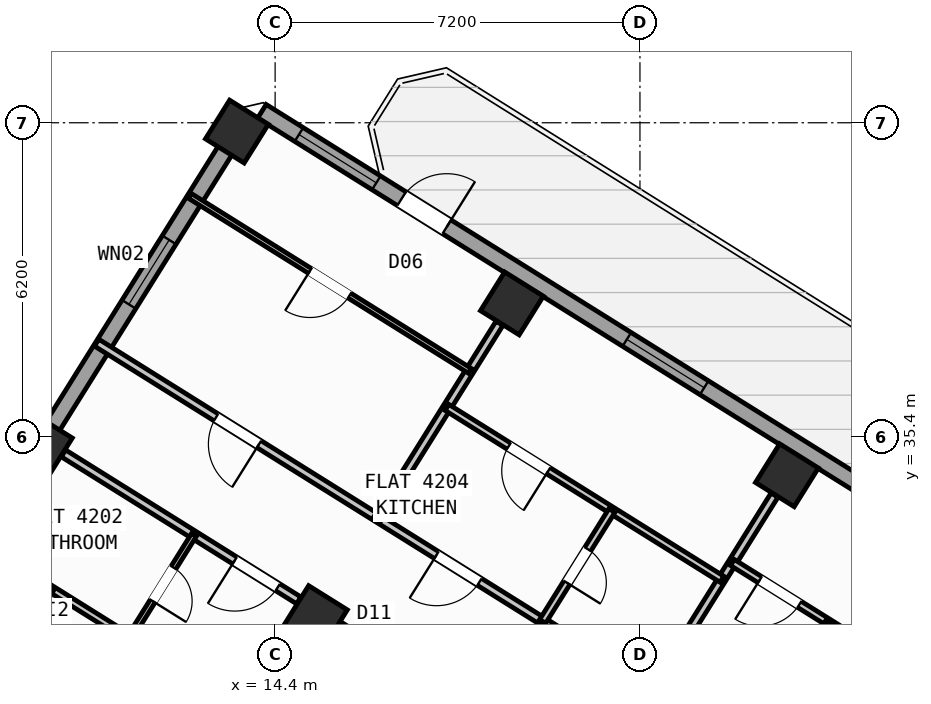
"""IFC4 building model, lengths in metres.
Left out: names, types, materials, properties, quantities, classifications, styles, units other than length and angle.
Written with IfcOpenShell. Run it as: python <this file> out.ifc"""

import sys

from ifc_helpers import new_model, si_unit, direction, frame, frame_2d, origin, origin_2d, place, context, subcontext, project, spatial, rectangle, hollow_rectangle, extrude, source, transform, mapped, element, fill, save


model = new_model("IFC4")
c1 = context("Model", 3, precision=1e-05, world=origin(), true_north=direction((0.0, 1.0)))
c2 = subcontext(c1, "Body", "Model", "MODEL_VIEW")
j1 = project(units=[si_unit("LENGTHUNIT", "METRE"), si_unit("PLANEANGLEUNIT", "RADIAN")], contexts=[c1])
p1 = place(None, origin())
s1 = spatial("IfcSite", under=j1, at=p1, CompositionType="ELEMENT")
p2 = place(p1, origin())
s2 = spatial("IfcBuilding", under=s1, at=p2, CompositionType="ELEMENT")
p3 = place(p2, frame((0.0, 0.0, 165.9)))
s3 = spatial("IfcBuildingStorey", under=s2, at=p3, CompositionType="ELEMENT", Elevation=165.9)
m1 = source(origin(), c2, "Body", "SweptSolid", [
    extrude(hollow_rectangle(XDim=0.9, YDim=0.9, WallThickness=0.036, at=origin_2d()), origin(), (0.0, 0.0, 1.0), 3.6),
])
for number, where, z_axis, x_axis in (
    (1, (24.5, 34.643, 0.0), (0.0, 0.0, 1.0), (-0.848, 0.53, 0.0)),
    (2, (19.073, 38.034, 0.0), (0.0, 0.0, 1.0), (-0.848, 0.53, 0.0)),
    (3, (15.205, 31.844, 0.0), (0.0, 0.0, 1.0), (-0.848, 0.53, 0.0)),
    (4, (13.646, 41.426, 0.0), (0.0, 0.0, 1.0), (-0.848, 0.53, 0.0)),
    (5, (9.777, 35.235, 0.0), (0.0, 0.0, 1.0), (-0.848, 0.53, 0.0)),
):
    element("IfcColumn", number, at=place(p3, frame(where, z_axis=z_axis, x_axis=x_axis)), inside=s3, PredefinedType="COLUMN", context=c2, shape_type="MappedRepresentation", body=[
        mapped(m1, transform((0.0, 0.0, 0.0), scale=1.0)),
    ])
p4 = place(p3, frame((2.415, 23.452, 0.0), z_axis=(0.0, 0.0, 1.0), x_axis=(0.52991049553, 0.848053575387, 0.0)))
e6 = element("IfcWall", 6, at=p4, inside=s3, PredefinedType="STANDARD", context=c2, shape_type="SweptSolid", body=[
    extrude(rectangle(XDim=21.587, YDim=0.32, at=frame_2d((10.794, 0.0))), origin(), (0.0, 0.0, 1.0), 2.795),
])
p5 = place(p4, frame((1.673, 0.0, 0.8)))
e7 = element("IfcOpeningElement", 7, at=p5, cuts=e6, PredefinedType="OPENING", context=c2, shape_type="SweptSolid", body=[
    extrude(rectangle(XDim=2.1, YDim=1.55, at=frame_2d((1.05, 0.775))), frame((0.0, 0.17, 0.0), z_axis=(0.0, -1.0, 0.0), x_axis=(1.0, 0.0, 0.0)), (0.0, 0.0, 1.0), 0.34),
])
p6 = place(p4, frame((8.334, 0.0, 0.85)))
e8 = element("IfcOpeningElement", 8, at=p6, cuts=e6, PredefinedType="OPENING", context=c2, shape_type="SweptSolid", body=[
    extrude(rectangle(XDim=1.8, YDim=1.5, at=frame_2d((0.9, 0.75))), frame((0.0, 0.17, 0.0), z_axis=(0.0, -1.0, 0.0), x_axis=(1.0, 0.0, 0.0)), (0.0, 0.0, 1.0), 0.34),
])
p7 = place(p4, frame((17.172, 0.0, 0.85)))
e9 = element("IfcOpeningElement", 9, at=p7, cuts=e6, PredefinedType="OPENING", context=c2, shape_type="SweptSolid", body=[
    extrude(rectangle(XDim=1.5, YDim=1.5, at=frame_2d((0.75, 0.75))), frame((0.0, 0.17, 0.0), z_axis=(0.0, -1.0, 0.0), x_axis=(1.0, 0.0, 0.0)), (0.0, 0.0, 1.0), 0.34),
])
p8 = place(p3, frame((14.138, 41.825, 0.0), z_axis=(0.0, 0.0, 1.0), x_axis=(0.848046498049, -0.529921821731, 0.0)))
e10 = element("IfcWall", 10, at=p8, inside=s3, PredefinedType="STANDARD", context=c2, shape_type="SweptSolid", body=[
    extrude(rectangle(XDim=31.588, YDim=0.32, at=frame_2d((15.794, 0.0))), origin(), (0.0, 0.0, 1.0), 3.32),
])
p9 = place(p8, frame((3.253, 0.0, 0.0)))
e11 = element("IfcOpeningElement", 11, at=p9, cuts=e10, PredefinedType="OPENING", context=c2, shape_type="SweptSolid", body=[
    extrude(rectangle(XDim=1.05, YDim=2.15, at=frame_2d((0.525, 1.075))), frame((0.0, 0.17, 0.0), z_axis=(0.0, -1.0, 0.0), x_axis=(1.0, 0.0, 0.0)), (0.0, 0.0, 1.0), 0.34),
])
p10 = place(p8, frame((0.863, 0.0, 0.85)))
e12 = element("IfcOpeningElement", 12, at=p10, cuts=e10, PredefinedType="OPENING", context=c2, shape_type="SweptSolid", body=[
    extrude(rectangle(XDim=1.8, YDim=1.5, at=frame_2d((0.9, 0.75))), frame((0.0, 0.17, 0.0), z_axis=(0.0, -1.0, 0.0), x_axis=(1.0, 0.0, 0.0)), (0.0, 0.0, 1.0), 0.34),
])
p11 = place(p8, frame((8.494, 0.0, 0.85)))
e13 = element("IfcOpeningElement", 13, at=p11, cuts=e10, PredefinedType="OPENING", context=c2, shape_type="SweptSolid", body=[
    extrude(rectangle(XDim=1.8, YDim=1.5, at=frame_2d((0.9, 0.75))), frame((0.0, 0.17, 0.0), z_axis=(0.0, -1.0, 0.0), x_axis=(1.0, 0.0, 0.0)), (0.0, 0.0, 1.0), 0.34),
])
p12 = place(p8, frame((13.874, 0.0, 0.85)))
e14 = element("IfcOpeningElement", 14, at=p12, cuts=e10, PredefinedType="OPENING", context=c2, shape_type="SweptSolid", body=[
    extrude(rectangle(XDim=1.5, YDim=1.5, at=frame_2d((0.75, 0.75))), frame((0.0, 0.17, 0.0), z_axis=(0.0, -1.0, 0.0), x_axis=(1.0, 0.0, 0.0)), (0.0, 0.0, 1.0), 0.34),
])
p13 = place(p8, frame((17.104, 0.0, 1.0)))
e15 = element("IfcOpeningElement", 15, at=p13, cuts=e10, PredefinedType="OPENING", context=c2, shape_type="SweptSolid", body=[
    extrude(rectangle(XDim=0.9, YDim=1.25, at=frame_2d((0.45, 0.625))), frame((0.0, 0.17, 0.0), z_axis=(0.0, -1.0, 0.0), x_axis=(1.0, 0.0, 0.0)), (0.0, 0.0, 1.0), 0.34),
])
p14 = place(p8, frame((22.144, 0.0, 1.0)))
e16 = element("IfcOpeningElement", 16, at=p14, cuts=e10, PredefinedType="OPENING", context=c2, shape_type="SweptSolid", body=[
    extrude(rectangle(XDim=0.9, YDim=1.25, at=frame_2d((0.45, 0.625))), frame((0.0, 0.17, 0.0), z_axis=(0.0, -1.0, 0.0), x_axis=(1.0, 0.0, 0.0)), (0.0, 0.0, 1.0), 0.34),
])
p15 = place(p8, frame((27.744, 0.0, 1.0)))
e17 = element("IfcOpeningElement", 17, at=p15, cuts=e10, PredefinedType="OPENING", context=c2, shape_type="SweptSolid", body=[
    extrude(rectangle(XDim=0.9, YDim=1.25, at=frame_2d((0.45, 0.625))), frame((0.0, 0.17, 0.0), z_axis=(0.0, -1.0, 0.0), x_axis=(1.0, 0.0, 0.0)), (0.0, 0.0, 1.0), 0.34),
])
p16 = place(p3, frame((27.953, 33.016, 0.0), z_axis=(0.0, 0.0, 1.0), x_axis=(-0.529906322364, -0.848056182997, 0.0)))
e18 = element("IfcWall", 18, at=p16, inside=s3, PredefinedType="PARTITIONING", context=c2, shape_type="SweptSolid", body=[
    extrude(rectangle(XDim=5.45, YDim=0.16, at=frame_2d((2.725, 0.0))), origin(), (0.0, 0.0, 1.0), 3.31),
])
p17 = place(p3, frame((25.065, 28.394, 0.0), z_axis=(0.0, 0.0, 1.0), x_axis=(-0.848048310262, 0.529918921593, 0.0)))
e19 = element("IfcWall", 19, at=p17, inside=s3, PredefinedType="PARTITIONING", context=c2, shape_type="SweptSolid", body=[
    extrude(rectangle(XDim=16.73, YDim=0.16, at=frame_2d((8.365, 0.0))), origin(), (0.0, 0.0, 1.0), 3.31),
])
p18 = place(p17, frame((2.22, 0.0, 0.0)))
e20 = element("IfcOpeningElement", 20, at=p18, cuts=e19, PredefinedType="OPENING", context=c2, shape_type="SweptSolid", body=[
    extrude(rectangle(XDim=0.86, YDim=2.05, at=frame_2d((0.43, 1.025))), frame((0.0, 0.09, 0.0), z_axis=(0.0, -1.0, 0.0), x_axis=(1.0, 0.0, 0.0)), (0.0, 0.0, 1.0), 0.18),
])
p19 = place(p17, frame((7.82, 0.0, 0.0)))
e21 = element("IfcOpeningElement", 21, at=p19, cuts=e19, PredefinedType="OPENING", context=c2, shape_type="SweptSolid", body=[
    extrude(rectangle(XDim=1.0, YDim=2.1, at=frame_2d((0.5, 1.05))), frame((0.0, 0.09, 0.0), z_axis=(0.0, -1.0, 0.0), x_axis=(1.0, 0.0, 0.0)), (0.0, 0.0, 1.0), 0.18),
])
p20 = place(p17, frame((12.95, 0.0, 0.0)))
e22 = element("IfcOpeningElement", 22, at=p20, cuts=e19, PredefinedType="OPENING", context=c2, shape_type="SweptSolid", body=[
    extrude(rectangle(XDim=1.0, YDim=2.1, at=frame_2d((0.5, 1.05))), frame((0.0, 0.09, 0.0), z_axis=(0.0, -1.0, 0.0), x_axis=(1.0, 0.0, 0.0)), (0.0, 0.0, 1.0), 0.18),
])
p21 = place(p3, frame((20.293, 28.782, 0.0), z_axis=(0.0, 0.0, 1.0), x_axis=(-0.848040881926, 0.529930809241, 0.0)))
e23 = element("IfcWall", 23, at=p21, inside=s3, PredefinedType="PARTITIONING", context=c2, shape_type="SweptSolid", body=[
    extrude(rectangle(XDim=5.476, YDim=0.16, at=frame_2d((2.738, 0.0))), origin(), (0.0, 0.0, 1.0), 2.795),
])
p22 = place(p21, frame((3.568, 0.0, 0.0)))
e24 = element("IfcOpeningElement", 24, at=p22, cuts=e23, PredefinedType="OPENING", context=c2, shape_type="SweptSolid", body=[
    extrude(rectangle(XDim=1.0, YDim=2.1, at=frame_2d((0.5, 1.05))), frame((0.0, 0.09, 0.0), z_axis=(0.0, -1.0, 0.0), x_axis=(1.0, 0.0, 0.0)), (0.0, 0.0, 1.0), 0.18),
])
p23 = place(p3, frame((14.866, 32.173, 0.0), z_axis=(0.0, 0.0, 1.0), x_axis=(-0.848053401719, 0.529910773464, 0.0)))
e25 = element("IfcWall", 25, at=p23, inside=s3, PredefinedType="PARTITIONING", context=c2, shape_type="SweptSolid", body=[
    extrude(rectangle(XDim=5.476, YDim=0.16, at=frame_2d((2.738, 0.0))), origin(), (0.0, 0.0, 1.0), 2.795),
])
p24 = place(p23, frame((0.488, 0.0, 0.0)))
e26 = element("IfcOpeningElement", 26, at=p24, cuts=e25, PredefinedType="OPENING", context=c2, shape_type="SweptSolid", body=[
    extrude(rectangle(XDim=1.0, YDim=2.1, at=frame_2d((0.5, 1.05))), frame((0.0, 0.09, 0.0), z_axis=(0.0, -1.0, 0.0), x_axis=(1.0, 0.0, 0.0)), (0.0, 0.0, 1.0), 0.18),
])
p25 = place(p3, frame((12.798, 33.465, 0.0), z_axis=(0.0, 0.0, 1.0), x_axis=(-0.529916182913, -0.848050021571, 0.0)))
e27 = element("IfcWall", 27, at=p25, inside=s3, PredefinedType="PARTITIONING", context=c2, shape_type="SweptSolid", body=[
    extrude(rectangle(XDim=14.32, YDim=0.11, at=frame_2d((7.16, 0.0))), origin(), (0.0, 0.0, 1.0), 3.31),
])
p26 = place(p25, frame((0.76, 0.0, 0.0)))
e28 = element("IfcOpeningElement", 28, at=p26, cuts=e27, PredefinedType="OPENING", context=c2, shape_type="SweptSolid", body=[
    extrude(rectangle(XDim=0.78, YDim=2.05, at=frame_2d((0.39, 1.025))), frame((0.0, 0.065, 0.0), z_axis=(0.0, -1.0, 0.0), x_axis=(1.0, 0.0, 0.0)), (0.0, 0.0, 1.0), 0.13),
])
p27 = place(p25, frame((5.281, 0.0, 0.0)))
e29 = element("IfcOpeningElement", 29, at=p27, cuts=e27, PredefinedType="OPENING", context=c2, shape_type="SweptSolid", body=[
    extrude(rectangle(XDim=0.92, YDim=2.08, at=frame_2d((0.46, 1.04))), frame((0.0, 0.065, 0.0), z_axis=(0.0, -1.0, 0.0), x_axis=(1.0, 0.0, 0.0)), (0.0, 0.0, 1.0), 0.13),
])
p28 = place(p3, frame((11.526, 31.43, 0.0), z_axis=(0.0, 0.0, 1.0), x_axis=(-0.848051346257, 0.52991406295, 0.0)))
e30 = element("IfcWall", 30, at=p28, inside=s3, PredefinedType="PLUMBINGWALL", context=c2, shape_type="SweptSolid", body=[
    extrude(rectangle(XDim=3.62, YDim=0.14, at=frame_2d((1.81, 0.0))), origin(), (0.0, 0.0, 1.0), 3.31),
])
p29 = place(p3, frame((24.256, 34.251, 0.0), z_axis=(0.0, 0.0, 1.0), x_axis=(-0.529926399231, -0.848043637673, 0.0)))
e31 = element("IfcWall", 31, at=p29, inside=s3, PredefinedType="PARTITIONING", context=c2, shape_type="SweptSolid", body=[
    extrude(rectangle(XDim=4.538, YDim=0.16, at=frame_2d((2.269, 0.0))), origin(), (0.0, 0.0, 1.0), 2.795),
])
p30 = place(p3, frame((26.639, 30.913, 0.0), z_axis=(0.0, 0.0, 1.0), x_axis=(-0.84803087207, 0.529946827537, 0.0)))
e32 = element("IfcWall", 32, at=p30, inside=s3, PredefinedType="PLUMBINGWALL", context=c2, shape_type="SweptSolid", body=[
    extrude(rectangle(XDim=3.79, YDim=0.14, at=frame_2d((1.895, 0.0))), origin(), (0.0, 0.0, 1.0), 3.31),
])
p31 = place(p30, frame((2.23, 0.0, 0.0)))
e33 = element("IfcOpeningElement", 33, at=p31, cuts=e32, PredefinedType="OPENING", context=c2, shape_type="SweptSolid", body=[
    extrude(rectangle(XDim=0.92, YDim=2.08, at=frame_2d((0.46, 1.04))), frame((0.0, 0.08, 0.0), z_axis=(0.0, -1.0, 0.0), x_axis=(1.0, 0.0, 0.0)), (0.0, 0.0, 1.0), 0.16),
])
p32 = place(p3, frame((25.324, 31.734, 0.0), z_axis=(0.0, 0.0, 1.0), x_axis=(-0.529873322326, -0.848076802116, 0.0)))
e34 = element("IfcWall", 34, at=p32, inside=s3, PredefinedType="PLUMBINGWALL", context=c2, shape_type="SweptSolid", body=[
    extrude(rectangle(XDim=2.97, YDim=0.14, at=frame_2d((1.485, 0.0))), origin(), (0.0, 0.0, 1.0), 2.935),
])
p33 = place(p32, frame((1.095, 0.0, 0.0)))
e35 = element("IfcOpeningElement", 35, at=p33, cuts=e34, PredefinedType="OPENING", context=c2, shape_type="SweptSolid", body=[
    extrude(rectangle(XDim=0.78, YDim=2.05, at=frame_2d((0.39, 1.025))), frame((0.0, 0.08, 0.0), z_axis=(0.0, -1.0, 0.0), x_axis=(1.0, 0.0, 0.0)), (0.0, 0.0, 1.0), 0.16),
])
p34 = place(p3, frame((18.828, 37.643, 0.0), z_axis=(0.0, 0.0, 1.0), x_axis=(-0.529926399231, -0.848043637673, 0.0)))
e36 = element("IfcWall", 36, at=p34, inside=s3, PredefinedType="PARTITIONING", context=c2, shape_type="SweptSolid", body=[
    extrude(rectangle(XDim=4.538, YDim=0.16, at=frame_2d((2.269, 0.0))), origin(), (0.0, 0.0, 1.0), 2.795),
])
p35 = place(p3, frame((23.218, 32.591, 0.0), z_axis=(0.0, 0.0, 1.0), x_axis=(-0.848056163074, 0.529906354247, 0.0)))
e37 = element("IfcWall", 37, at=p35, inside=s3, PredefinedType="PLUMBINGWALL", context=c2, shape_type="SweptSolid", body=[
    extrude(rectangle(XDim=6.4, YDim=0.14, at=frame_2d((3.2, 0.0))), origin(), (0.0, 0.0, 1.0), 3.31),
])
p36 = place(p35, frame((4.04, 0.0, 0.0)))
e38 = element("IfcOpeningElement", 38, at=p36, cuts=e37, PredefinedType="OPENING", context=c2, shape_type="SweptSolid", body=[
    extrude(rectangle(XDim=0.92, YDim=2.08, at=frame_2d((0.46, 1.04))), frame((0.0, 0.08, 0.0), z_axis=(0.0, -1.0, 0.0), x_axis=(1.0, 0.0, 0.0)), (0.0, 0.0, 1.0), 0.16),
])
p37 = place(p3, frame((21.047, 33.947, 0.0), z_axis=(0.0, 0.0, 1.0), x_axis=(-0.529913878929, -0.848051461244, 0.0)))
e39 = element("IfcWall", 39, at=p37, inside=s3, PredefinedType="PLUMBINGWALL", context=c2, shape_type="SweptSolid", body=[
    extrude(rectangle(XDim=2.58, YDim=0.14, at=frame_2d((1.29, 0.0))), origin(), (0.0, 0.0, 1.0), 3.31),
])
p38 = place(p37, frame((0.9, 0.0, 0.0)))
e40 = element("IfcOpeningElement", 40, at=p38, cuts=e39, PredefinedType="OPENING", context=c2, shape_type="SweptSolid", body=[
    extrude(rectangle(XDim=0.78, YDim=2.05, at=frame_2d((0.39, 1.025))), frame((0.0, 0.08, 0.0), z_axis=(0.0, -1.0, 0.0), x_axis=(1.0, 0.0, 0.0)), (0.0, 0.0, 1.0), 0.16),
])
p39 = place(p3, frame((18.242, 36.705, 0.0), z_axis=(0.0, 0.0, 1.0), x_axis=(-0.848048787466, 0.529918157905, 0.0)))
e41 = element("IfcWall", 41, at=p39, inside=s3, PredefinedType="PARTITIONING", context=c2, shape_type="SweptSolid", body=[
    extrude(rectangle(XDim=6.52, YDim=0.11, at=frame_2d((3.26, 0.0))), origin(), (0.0, 0.0, 1.0), 3.31),
])
p40 = place(p39, frame((2.8, 0.0, 0.0)))
e42 = element("IfcOpeningElement", 42, at=p40, cuts=e41, PredefinedType="OPENING", context=c2, shape_type="SweptSolid", body=[
    extrude(rectangle(XDim=0.92, YDim=2.08, at=frame_2d((0.46, 1.04))), frame((0.0, 0.065, 0.0), z_axis=(0.0, -1.0, 0.0), x_axis=(1.0, 0.0, 0.0)), (0.0, 0.0, 1.0), 0.13),
])
m2 = source(origin(), c2, "Body", "SweptSolid", [
    extrude(rectangle(XDim=1.05, YDim=2.15, at=frame_2d((0.525, 1.075))), frame((0.0, 0.025, 0.0), z_axis=(0.0, -1.0, 0.0), x_axis=(1.0, 0.0, 0.0)), (0.0, 0.0, 1.0), 0.05),
])
p41 = place(p9, origin())
e43 = element("IfcDoor", 43, at=p41, inside=s3, OperationType="SINGLE_SWING_RIGHT", PredefinedType="DOOR", context=c2, shape_type="MappedRepresentation", body=[
    mapped(m2, transform((0.0, 0.0, 0.0), scale=1.0)),
])
fill(e11, e43)
m3 = source(origin(), c2, "Body", "SweptSolid", [
    extrude(rectangle(XDim=1.5, YDim=1.5, at=frame_2d((0.75, 0.75))), frame((0.0, 0.03, 0.0), z_axis=(0.0, -1.0, 0.0), x_axis=(1.0, 0.0, 0.0)), (0.0, 0.0, 1.0), 0.06),
])
p42 = place(p7, origin())
e44 = element("IfcWindow", 44, at=p42, inside=s3, PartitioningType="SINGLE_PANEL", PredefinedType="WINDOW", context=c2, shape_type="MappedRepresentation", body=[
    mapped(m3, transform((0.0, 0.0, 0.0), scale=1.0)),
])
fill(e9, e44)
m4 = source(origin(), c2, "Body", "SweptSolid", [
    extrude(rectangle(XDim=1.8, YDim=1.5, at=frame_2d((0.9, 0.75))), frame((0.0, 0.03, 0.0), z_axis=(0.0, -1.0, 0.0), x_axis=(1.0, 0.0, 0.0)), (0.0, 0.0, 1.0), 0.06),
])
p43 = place(p10, origin())
e45 = element("IfcWindow", 45, at=p43, inside=s3, PartitioningType="SINGLE_PANEL", PredefinedType="WINDOW", context=c2, shape_type="MappedRepresentation", body=[
    mapped(m4, transform((0.0, 0.0, 0.0), scale=1.0)),
])
fill(e12, e45)
p44 = place(p11, origin())
e46 = element("IfcWindow", 46, at=p44, inside=s3, PartitioningType="SINGLE_PANEL", PredefinedType="WINDOW", context=c2, shape_type="MappedRepresentation", body=[
    mapped(m4, transform((0.0, 0.0, 0.0), scale=1.0)),
])
fill(e13, e46)
m5 = source(origin(), c2, "Body", "SweptSolid", [
    extrude(rectangle(XDim=1.0, YDim=2.1, at=frame_2d((0.5, 1.05))), frame((0.0, 0.025, 0.0), z_axis=(0.0, -1.0, 0.0), x_axis=(1.0, 0.0, 0.0)), (0.0, 0.0, 1.0), 0.05),
])
p45 = place(p24, origin())
e47 = element("IfcDoor", 47, at=p45, inside=s3, OperationType="SINGLE_SWING_RIGHT", PredefinedType="DOOR", context=c2, shape_type="MappedRepresentation", body=[
    mapped(m5, transform((0.0, 0.0, 0.0), scale=1.0)),
])
fill(e26, e47)
m6 = source(origin(), c2, "Body", "SweptSolid", [
    extrude(rectangle(XDim=0.78, YDim=2.05, at=frame_2d((0.39, 1.025))), frame((0.0, 0.025, 0.0), z_axis=(0.0, -1.0, 0.0), x_axis=(1.0, 0.0, 0.0)), (0.0, 0.0, 1.0), 0.05),
])
p46 = place(p26, origin())
e48 = element("IfcDoor", 48, at=p46, inside=s3, OperationType="SINGLE_SWING_RIGHT", PredefinedType="DOOR", context=c2, shape_type="MappedRepresentation", body=[
    mapped(m6, transform((0.0, 0.0, 0.0), scale=1.0)),
])
fill(e28, e48)
m7 = source(origin(), c2, "Body", "SweptSolid", [
    extrude(rectangle(XDim=0.92, YDim=2.08, at=frame_2d((0.46, 1.04))), frame((0.0, 0.025, 0.0), z_axis=(0.0, -1.0, 0.0), x_axis=(1.0, 0.0, 0.0)), (0.0, 0.0, 1.0), 0.05),
])
p47 = place(p31, origin())
e49 = element("IfcDoor", 49, at=p47, inside=s3, OperationType="SINGLE_SWING_RIGHT", PredefinedType="DOOR", context=c2, shape_type="MappedRepresentation", body=[
    mapped(m7, transform((0.0, 0.0, 0.0), scale=1.0)),
])
fill(e33, e49)
p48 = place(p19, origin())
e50 = element("IfcDoor", 50, at=p48, inside=s3, OperationType="SINGLE_SWING_RIGHT", PredefinedType="DOOR", context=c2, shape_type="MappedRepresentation", body=[
    mapped(m5, transform((0.0, 0.0, 0.0), scale=1.0)),
])
fill(e21, e50)
p49 = place(p36, origin())
e51 = element("IfcDoor", 51, at=p49, inside=s3, OperationType="SINGLE_SWING_LEFT", PredefinedType="DOOR", context=c2, shape_type="MappedRepresentation", body=[
    mapped(m7, transform((0.0, 0.0, 0.0), scale=1.0)),
])
fill(e38, e51)
p50 = place(p38, origin())
e52 = element("IfcDoor", 52, at=p50, inside=s3, OperationType="SINGLE_SWING_RIGHT", PredefinedType="DOOR", context=c2, shape_type="MappedRepresentation", body=[
    mapped(m6, transform((0.0, 0.0, 0.0), scale=1.0)),
])
fill(e40, e52)
p51 = place(p20, origin())
e53 = element("IfcDoor", 53, at=p51, inside=s3, OperationType="SINGLE_SWING_LEFT", PredefinedType="DOOR", context=c2, shape_type="MappedRepresentation", body=[
    mapped(m5, transform((0.0, 0.0, 0.0), scale=1.0)),
])
fill(e22, e53)
p52 = place(p40, origin())
e54 = element("IfcDoor", 54, at=p52, inside=s3, OperationType="SINGLE_SWING_RIGHT", PredefinedType="DOOR", context=c2, shape_type="MappedRepresentation", body=[
    mapped(m7, transform((0.0, 0.0, 0.0), scale=1.0)),
])
fill(e42, e54)
save(model, sys.argv[1])
